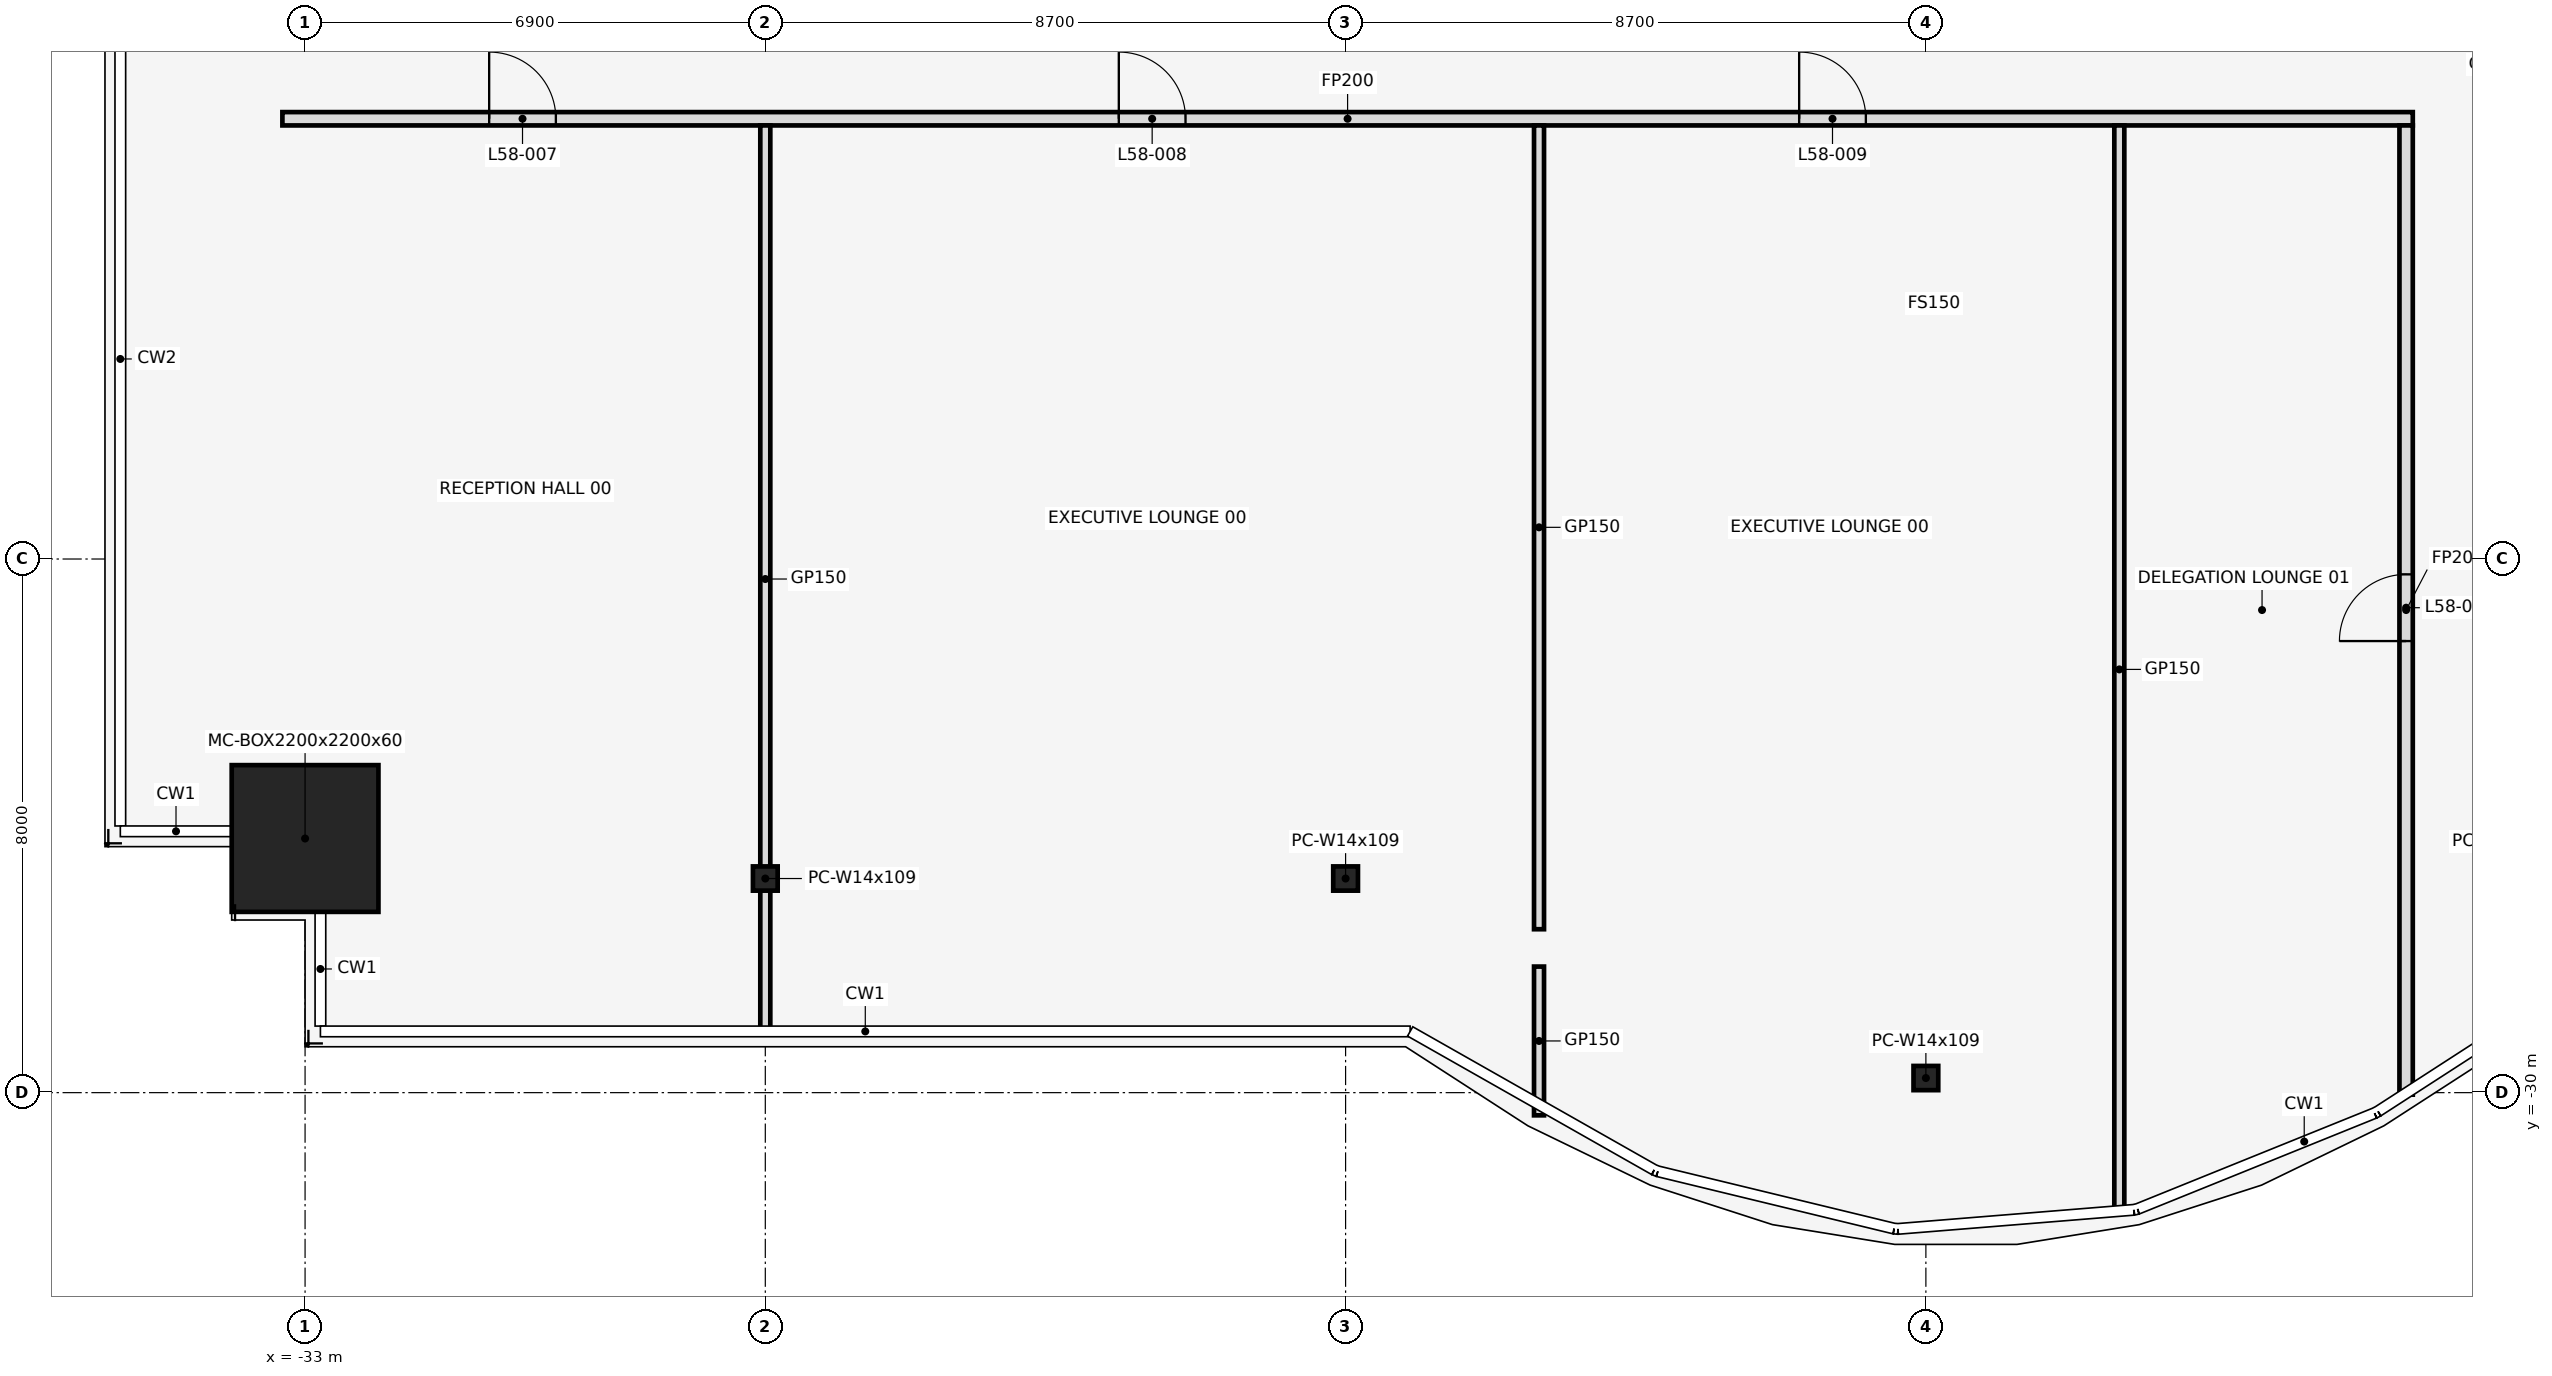
"""IFC4 building model, lengths in metres.
Left out: names, types, materials, properties, quantities, classifications, styles, units other than length and angle.
Written with IfcOpenShell. Run it as: python <this file> out.ifc"""

import sys

from ifc_helpers import new_model, si_unit, direction, frame, frame_2d, origin, origin_2d, place, context, subcontext, project, spatial, rectangle, hollow_rectangle, i_section, extrude, element, fill, save


model = new_model("IFC4")
c1 = context("Model", 3, precision=1e-05, world=origin(), true_north=direction((0.0, 1.0)))
c2 = subcontext(c1, "Body", "Model", "MODEL_VIEW")
j1 = project(units=[si_unit("LENGTHUNIT", "METRE"), si_unit("PLANEANGLEUNIT", "RADIAN")], contexts=[c1])
p1 = place(None, origin())
s1 = spatial("IfcSite", under=j1, at=p1, CompositionType="ELEMENT")
p2 = place(p1, origin())
s2 = spatial("IfcBuilding", under=s1, at=p2, CompositionType="ELEMENT")
p3 = place(p2, frame((0.0, 0.0, 258.2)))
s3 = spatial("IfcBuildingStorey", under=s2, at=p3, CompositionType="ELEMENT", Elevation=258.2)
p4 = place(p3, frame((-33.0, -26.19, 0.0), z_axis=(0.0, 0.0, 1.0), x_axis=(1.0, 0.0, 0.0)))
e1 = element("IfcColumn", 1, at=p4, inside=s3, PredefinedType="COLUMN", context=c2, shape_type="SweptSolid", body=[
    extrude(hollow_rectangle(XDim=2.2, YDim=2.2, WallThickness=0.06, at=origin_2d()), origin(), (0.0, 0.0, 1.0), 4.2),
])
for number, where, z_axis, x_axis in (
    (2, (-26.1, -26.79, 0.0), (0.0, 0.0, 1.0), (1.0, 0.0, 0.0)),
    (3, (-17.4, -26.79, 0.0), (0.0, 0.0, 1.0), (1.0, 0.0, 0.0)),
    (4, (-8.7, -29.781, 0.0), (0.0, 0.0, 1.0), (1.0, 0.0, 0.0)),
):
    element("IfcColumn", number, at=place(p3, frame(where, z_axis=z_axis, x_axis=x_axis)), inside=s3, PredefinedType="COLUMN", context=c2, shape_type="SweptSolid", body=[
        extrude(i_section(OverallWidth=0.371, OverallDepth=0.363, WebThickness=0.013, FlangeThickness=0.022, at=origin_2d()), origin(), (0.0, 0.0, 1.0), 4.2),
    ])
p5 = place(p3, frame((-33.34, -15.4, 0.0), z_axis=(0.0, 0.0, 1.0), x_axis=(1.0, 0.0, 0.0)))
e5 = element("IfcWall", 5, at=p5, inside=s3, PredefinedType="PARTITIONING", context=c2, shape_type="SweptSolid", body=[
    extrude(rectangle(XDim=31.94, YDim=0.2, at=frame_2d((15.97, 0.0))), origin(), (0.0, 0.0, 1.0), 3.118),
])
p6 = place(p5, frame((3.1, 0.0, 0.0)))
e6 = element("IfcOpeningElement", 6, at=p6, cuts=e5, PredefinedType="OPENING", context=c2, shape_type="SweptSolid", body=[
    extrude(rectangle(XDim=1.0, YDim=2.1, at=frame_2d((0.5, 1.05))), frame((0.0, 0.112, 0.0), z_axis=(0.0, -1.0, 0.0), x_axis=(1.0, 0.0, 0.0)), (0.0, 0.0, 1.0), 0.224),
])
p7 = place(p5, frame((12.54, 0.0, 0.0)))
e7 = element("IfcOpeningElement", 7, at=p7, cuts=e5, PredefinedType="OPENING", context=c2, shape_type="SweptSolid", body=[
    extrude(rectangle(XDim=1.0, YDim=2.1, at=frame_2d((0.5, 1.05))), frame((0.0, 0.112, 0.0), z_axis=(0.0, -1.0, 0.0), x_axis=(1.0, 0.0, 0.0)), (0.0, 0.0, 1.0), 0.224),
])
p8 = place(p5, frame((22.74, 0.0, 0.0)))
e8 = element("IfcOpeningElement", 8, at=p8, cuts=e5, PredefinedType="OPENING", context=c2, shape_type="SweptSolid", body=[
    extrude(rectangle(XDim=1.0, YDim=2.1, at=frame_2d((0.5, 1.05))), frame((0.0, 0.112, 0.0), z_axis=(0.0, -1.0, 0.0), x_axis=(1.0, 0.0, 0.0)), (0.0, 0.0, 1.0), 0.224),
])
p9 = place(p3, frame((-26.1, -29.1, 0.0), z_axis=(0.0, 0.0, 1.0), x_axis=(0.0, 1.0, 0.0)))
e9 = element("IfcWall", 9, at=p9, inside=s3, PredefinedType="PARTITIONING", context=c2, shape_type="SweptSolid", body=[
    extrude(rectangle(XDim=13.6, YDim=0.15, at=frame_2d((6.8, 0.0))), origin(), (0.0, 0.0, 1.0), 3.118),
])
p10 = place(p3, frame((-14.5, -30.34, 0.0), z_axis=(0.0, 0.0, 1.0), x_axis=(0.0, 1.0, 0.0)))
e10 = element("IfcWall", 10, at=p10, inside=s3, PredefinedType="PARTITIONING", context=c2, shape_type="SweptSolid", body=[
    extrude(rectangle(XDim=2.23, YDim=0.15, at=frame_2d((1.115, 0.0))), origin(), (0.0, 0.0, 1.0), 3.118),
])
p11 = place(p3, frame((-14.5, -27.55, 0.0), z_axis=(0.0, 0.0, 1.0), x_axis=(0.0, 1.0, 0.0)))
e11 = element("IfcWall", 11, at=p11, inside=s3, PredefinedType="PARTITIONING", context=c2, shape_type="SweptSolid", body=[
    extrude(rectangle(XDim=12.05, YDim=0.15, at=frame_2d((6.025, 0.0))), origin(), (0.0, 0.0, 1.0), 3.118),
])
p12 = place(p3, frame((-5.8, -31.81, 0.0), z_axis=(0.0, 0.0, 1.0), x_axis=(0.0, 1.0, 0.0)))
e12 = element("IfcWall", 12, at=p12, inside=s3, PredefinedType="PARTITIONING", context=c2, shape_type="SweptSolid", body=[
    extrude(rectangle(XDim=16.31, YDim=0.15, at=frame_2d((8.155, 0.0))), origin(), (0.0, 0.0, 1.0), 3.118),
])
p13 = place(p3, frame((-1.5, -30.03, 0.0), z_axis=(0.0, 0.0, 1.0), x_axis=(0.0, 1.0, 0.0)))
e13 = element("IfcWall", 13, at=p13, inside=s3, PredefinedType="PARTITIONING", context=c2, shape_type="SweptSolid", body=[
    extrude(rectangle(XDim=14.53, YDim=0.2, at=frame_2d((7.265, 0.0))), origin(), (0.0, 0.0, 1.0), 3.118),
])
p14 = place(p13, frame((6.8, 0.0, 0.0)))
e14 = element("IfcOpeningElement", 14, at=p14, cuts=e13, PredefinedType="OPENING", context=c2, shape_type="SweptSolid", body=[
    extrude(rectangle(XDim=1.0, YDim=2.1, at=frame_2d((0.5, 1.05))), frame((0.0, 0.112, 0.0), z_axis=(0.0, -1.0, 0.0), x_axis=(1.0, 0.0, 0.0)), (0.0, 0.0, 1.0), 0.224),
])
p15 = place(p6, frame((1.0, 0.0, 0.0), z_axis=(0.0, 0.0, 1.0), x_axis=(-1.0, 0.0, 0.0)))
e15 = element("IfcDoor", 15, at=p15, inside=s3, OperationType="SINGLE_SWING_LEFT", PredefinedType="DOOR", context=c2, shape_type="SweptSolid", body=[
    extrude(rectangle(XDim=1.0, YDim=2.1, at=frame_2d((0.5, 1.05))), frame((0.0, 0.025, 0.0), z_axis=(0.0, -1.0, 0.0), x_axis=(1.0, 0.0, 0.0)), (0.0, 0.0, 1.0), 0.05),
])
fill(e6, e15)
p16 = place(p7, frame((1.0, 0.0, 0.0), z_axis=(0.0, 0.0, 1.0), x_axis=(-1.0, 0.0, 0.0)))
e16 = element("IfcDoor", 16, at=p16, inside=s3, OperationType="SINGLE_SWING_RIGHT", PredefinedType="DOOR", context=c2, shape_type="SweptSolid", body=[
    extrude(rectangle(XDim=1.0, YDim=2.1, at=frame_2d((0.5, 1.05))), frame((0.0, 0.025, 0.0), z_axis=(0.0, -1.0, 0.0), x_axis=(1.0, 0.0, 0.0)), (0.0, 0.0, 1.0), 0.05),
])
fill(e7, e16)
p17 = place(p8, frame((1.0, 0.0, 0.0), z_axis=(0.0, 0.0, 1.0), x_axis=(-1.0, 0.0, 0.0)))
e17 = element("IfcDoor", 17, at=p17, inside=s3, OperationType="SINGLE_SWING_RIGHT", PredefinedType="DOOR", context=c2, shape_type="SweptSolid", body=[
    extrude(rectangle(XDim=1.0, YDim=2.1, at=frame_2d((0.5, 1.05))), frame((0.0, 0.025, 0.0), z_axis=(0.0, -1.0, 0.0), x_axis=(1.0, 0.0, 0.0)), (0.0, 0.0, 1.0), 0.05),
])
fill(e8, e17)
p18 = place(p14, origin())
e18 = element("IfcDoor", 18, at=p18, inside=s3, OperationType="SINGLE_SWING_LEFT", PredefinedType="DOOR", context=c2, shape_type="SweptSolid", body=[
    extrude(rectangle(XDim=1.0, YDim=2.1, at=frame_2d((0.5, 1.05))), frame((0.0, 0.025, 0.0), z_axis=(0.0, -1.0, 0.0), x_axis=(1.0, 0.0, 0.0)), (0.0, 0.0, 1.0), 0.05),
])
fill(e14, e18)
save(model, sys.argv[1])
